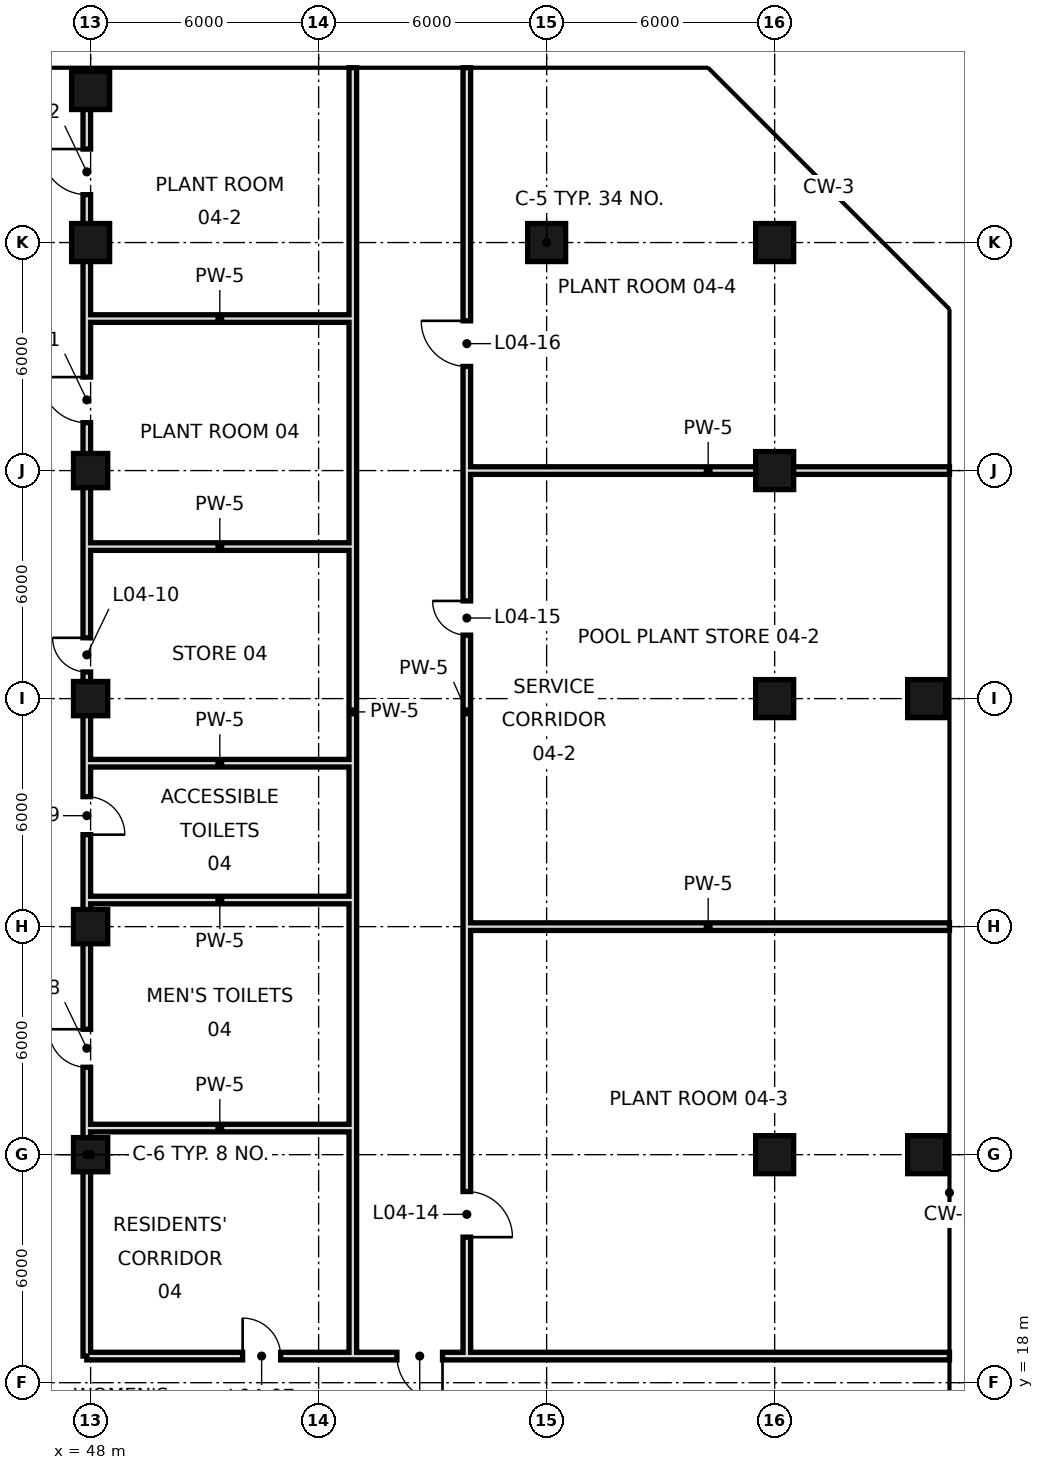
"""IFC4 building model, lengths in metres.
Left out: names, types, materials, properties, quantities, classifications, styles, units other than length and angle.
Written with IfcOpenShell. Run it as: python <this file> out.ifc"""

import sys

from ifc_helpers import new_model, si_unit, direction, frame, frame_2d, origin, origin_2d, place, context, subcontext, project, spatial, rectangle, hollow_rectangle, extrude, element, fill, save


model = new_model("IFC4")
c1 = context("Model", 3, precision=1e-05, world=origin(), true_north=direction((0.0, 1.0)))
c2 = subcontext(c1, "Body", "Model", "MODEL_VIEW")
j1 = project(units=[si_unit("LENGTHUNIT", "METRE"), si_unit("PLANEANGLEUNIT", "RADIAN")], contexts=[c1])
p1 = place(None, origin())
s1 = spatial("IfcSite", under=j1, at=p1, CompositionType="ELEMENT")
p2 = place(p1, origin())
s2 = spatial("IfcBuilding", under=s1, at=p2, CompositionType="ELEMENT")
p3 = place(p2, frame((0.0, 0.0, 30.0)))
s3 = spatial("IfcBuildingStorey", under=s2, at=p3, CompositionType="ELEMENT", Elevation=30.0)
for number, where, z_axis, x_axis in (
    (1, (48.0, 24.0, 0.0), (0.0, 0.0, 1.0), (1.0, 0.0, 0.0)),
    (2, (48.0, 30.0, 0.0), (0.0, 0.0, 1.0), (1.0, 0.0, 0.0)),
    (3, (48.0, 36.0, 0.0), (0.0, 0.0, 1.0), (1.0, 0.0, 0.0)),
    (4, (48.0, 42.0, 0.0), (0.0, 0.0, 1.0), (1.0, 0.0, 0.0)),
):
    element("IfcColumn", number, at=place(p3, frame(where, z_axis=z_axis, x_axis=x_axis)), inside=s3, PredefinedType="COLUMN", context=c2, shape_type="SweptSolid", body=[
        extrude(hollow_rectangle(XDim=0.9, YDim=0.9, WallThickness=0.045, at=origin_2d()), origin(), (0.0, 0.0, 1.0), 4.8),
    ])
for number, where, z_axis, x_axis in (
    (5, (48.0, 48.0, 0.0), (0.0, 0.0, 1.0), (1.0, 0.0, 0.0)),
    (6, (48.0, 52.0, 0.0), (0.0, 0.0, 1.0), (1.0, 0.0, 0.0)),
    (7, (60.0, 48.0, 0.0), (0.0, 0.0, 1.0), (1.0, 0.0, 0.0)),
    (8, (66.0, 24.0, 0.0), (0.0, 0.0, 1.0), (1.0, 0.0, 0.0)),
    (9, (66.0, 36.0, 0.0), (0.0, 0.0, 1.0), (1.0, 0.0, 0.0)),
    (10, (66.0, 42.0, 0.0), (0.0, 0.0, 1.0), (1.0, 0.0, 0.0)),
    (11, (66.0, 48.0, 0.0), (0.0, 0.0, 1.0), (1.0, 0.0, 0.0)),
    (12, (70.0, 24.0, 0.0), (0.0, 0.0, 1.0), (1.0, 0.0, 0.0)),
    (13, (70.0, 36.0, 0.0), (0.0, 0.0, 1.0), (1.0, 0.0, 0.0)),
):
    element("IfcColumn", number, at=place(p3, frame(where, z_axis=z_axis, x_axis=x_axis)), inside=s3, PredefinedType="COLUMN", context=c2, shape_type="SweptSolid", body=[
        extrude(hollow_rectangle(XDim=1.0, YDim=1.0, WallThickness=0.05, at=origin_2d()), origin(), (0.0, 0.0, 1.0), 4.8),
    ])
p4 = place(p3, frame((47.9, 18.7, 0.0), z_axis=(0.0, 0.0, 1.0), x_axis=(0.0, 1.0, 0.0)))
e14 = element("IfcWall", 14, at=p4, inside=s3, PredefinedType="SOLIDWALL", context=c2, shape_type="SweptSolid", body=[
    extrude(rectangle(XDim=33.3, YDim=0.2, at=frame_2d((16.65, 0.0))), origin(), (0.0, 0.0, 1.0), 3.7),
])
p5 = place(p4, frame((7.6, 0.0, 0.0)))
e15 = element("IfcOpeningElement", 15, at=p5, cuts=e14, PredefinedType="OPENING", context=c2, shape_type="SweptSolid", body=[
    extrude(rectangle(XDim=1.0, YDim=2.4, at=frame_2d((0.5, 1.2))), frame((0.0, 0.11, 0.0), z_axis=(0.0, -1.0, 0.0), x_axis=(1.0, 0.0, 0.0)), (0.0, 0.0, 1.0), 0.22),
])
p6 = place(p4, frame((13.72, 0.0, 0.0)))
e16 = element("IfcOpeningElement", 16, at=p6, cuts=e14, PredefinedType="OPENING", context=c2, shape_type="SweptSolid", body=[
    extrude(rectangle(XDim=1.0, YDim=2.4, at=frame_2d((0.5, 1.2))), frame((0.0, 0.11, 0.0), z_axis=(0.0, -1.0, 0.0), x_axis=(1.0, 0.0, 0.0)), (0.0, 0.0, 1.0), 0.22),
])
p7 = place(p4, frame((18.0, 0.0, 0.0)))
e17 = element("IfcOpeningElement", 17, at=p7, cuts=e14, PredefinedType="OPENING", context=c2, shape_type="SweptSolid", body=[
    extrude(rectangle(XDim=0.9, YDim=2.1, at=frame_2d((0.45, 1.05))), frame((0.0, 0.11, 0.0), z_axis=(0.0, -1.0, 0.0), x_axis=(1.0, 0.0, 0.0)), (0.0, 0.0, 1.0), 0.22),
])
p8 = place(p4, frame((24.56, 0.0, 0.0)))
e18 = element("IfcOpeningElement", 18, at=p8, cuts=e14, PredefinedType="OPENING", context=c2, shape_type="SweptSolid", body=[
    extrude(rectangle(XDim=1.2, YDim=2.4, at=frame_2d((0.6, 1.2))), frame((0.0, 0.11, 0.0), z_axis=(0.0, -1.0, 0.0), x_axis=(1.0, 0.0, 0.0)), (0.0, 0.0, 1.0), 0.22),
])
p9 = place(p4, frame((30.56, 0.0, 0.0)))
e19 = element("IfcOpeningElement", 19, at=p9, cuts=e14, PredefinedType="OPENING", context=c2, shape_type="SweptSolid", body=[
    extrude(rectangle(XDim=1.2, YDim=2.4, at=frame_2d((0.6, 1.2))), frame((0.0, 0.11, 0.0), z_axis=(0.0, -1.0, 0.0), x_axis=(1.0, 0.0, 0.0)), (0.0, 0.0, 1.0), 0.22),
])
p10 = place(p3, frame((54.9, 18.7, 0.0), z_axis=(0.0, 0.0, 1.0), x_axis=(0.0, 1.0, 0.0)))
e20 = element("IfcWall", 20, at=p10, inside=s3, PredefinedType="SOLIDWALL", context=c2, shape_type="SweptSolid", body=[
    extrude(rectangle(XDim=33.9, YDim=0.2, at=frame_2d((16.95, 0.0))), origin(), (0.0, 0.0, 1.0), 3.5),
])
p11 = place(p3, frame((57.9, 18.7, 0.0), z_axis=(0.0, 0.0, 1.0), x_axis=(0.0, 1.0, 0.0)))
e21 = element("IfcWall", 21, at=p11, inside=s3, PredefinedType="SOLIDWALL", context=c2, shape_type="SweptSolid", body=[
    extrude(rectangle(XDim=33.9, YDim=0.2, at=frame_2d((16.95, 0.0))), origin(), (0.0, 0.0, 1.0), 3.5),
])
p12 = place(p11, frame((3.13, 0.0, 0.0)))
e22 = element("IfcOpeningElement", 22, at=p12, cuts=e21, PredefinedType="OPENING", context=c2, shape_type="SweptSolid", body=[
    extrude(rectangle(XDim=1.2, YDim=2.4, at=frame_2d((0.6, 1.2))), frame((0.0, 0.11, 0.0), z_axis=(0.0, -1.0, 0.0), x_axis=(1.0, 0.0, 0.0)), (0.0, 0.0, 1.0), 0.22),
])
p13 = place(p11, frame((18.97, 0.0, 0.0)))
e23 = element("IfcOpeningElement", 23, at=p13, cuts=e21, PredefinedType="OPENING", context=c2, shape_type="SweptSolid", body=[
    extrude(rectangle(XDim=0.9, YDim=2.1, at=frame_2d((0.45, 1.05))), frame((0.0, 0.11, 0.0), z_axis=(0.0, -1.0, 0.0), x_axis=(1.0, 0.0, 0.0)), (0.0, 0.0, 1.0), 0.22),
])
p14 = place(p11, frame((26.04, 0.0, 0.0)))
e24 = element("IfcOpeningElement", 24, at=p14, cuts=e21, PredefinedType="OPENING", context=c2, shape_type="SweptSolid", body=[
    extrude(rectangle(XDim=1.2, YDim=2.4, at=frame_2d((0.6, 1.2))), frame((0.0, 0.11, 0.0), z_axis=(0.0, -1.0, 0.0), x_axis=(1.0, 0.0, 0.0)), (0.0, 0.0, 1.0), 0.22),
])
p15 = place(p3, frame((47.9, 18.7, 0.0), z_axis=(0.0, 0.0, 1.0), x_axis=(1.0, 0.0, 0.0)))
e25 = element("IfcWall", 25, at=p15, inside=s3, PredefinedType="SOLIDWALL", context=c2, shape_type="SweptSolid", body=[
    extrude(rectangle(XDim=22.7, YDim=0.2, at=frame_2d((11.35, 0.0))), origin(), (0.0, 0.0, 1.0), 3.7),
])
p16 = place(p15, frame((4.1, 0.0, 0.0)))
e26 = element("IfcOpeningElement", 26, at=p16, cuts=e25, PredefinedType="OPENING", context=c2, shape_type="SweptSolid", body=[
    extrude(rectangle(XDim=1.0, YDim=2.4, at=frame_2d((0.5, 1.2))), frame((0.0, 0.11, 0.0), z_axis=(0.0, -1.0, 0.0), x_axis=(1.0, 0.0, 0.0)), (0.0, 0.0, 1.0), 0.22),
])
p17 = place(p15, frame((8.16, 0.0, 0.0)))
e27 = element("IfcOpeningElement", 27, at=p17, cuts=e25, PredefinedType="OPENING", context=c2, shape_type="SweptSolid", body=[
    extrude(rectangle(XDim=1.2, YDim=2.4, at=frame_2d((0.6, 1.2))), frame((0.0, 0.11, 0.0), z_axis=(0.0, -1.0, 0.0), x_axis=(1.0, 0.0, 0.0)), (0.0, 0.0, 1.0), 0.22),
])
p18 = place(p3, frame((47.9, 24.7, 0.0), z_axis=(0.0, 0.0, 1.0), x_axis=(1.0, 0.0, 0.0)))
e28 = element("IfcWall", 28, at=p18, inside=s3, PredefinedType="SOLIDWALL", context=c2, shape_type="SweptSolid", body=[
    extrude(rectangle(XDim=7.0, YDim=0.2, at=frame_2d((3.5, 0.0))), origin(), (0.0, 0.0, 1.0), 3.95),
])
p19 = place(p3, frame((57.9, 30.0, 0.0), z_axis=(0.0, 0.0, 1.0), x_axis=(1.0, 0.0, 0.0)))
e29 = element("IfcWall", 29, at=p19, inside=s3, PredefinedType="SOLIDWALL", context=c2, shape_type="SweptSolid", body=[
    extrude(rectangle(XDim=12.7, YDim=0.2, at=frame_2d((6.35, 0.0))), origin(), (0.0, 0.0, 1.0), 3.5),
])
for number, where, z_axis, x_axis in (
    (30, (47.9, 30.7, 0.0), (0.0, 0.0, 1.0), (1.0, 0.0, 0.0)),
    (31, (47.9, 34.3, 0.0), (0.0, 0.0, 1.0), (1.0, 0.0, 0.0)),
    (32, (47.9, 40.0, 0.0), (0.0, 0.0, 1.0), (1.0, 0.0, 0.0)),
):
    element("IfcWall", number, at=place(p3, frame(where, z_axis=z_axis, x_axis=x_axis)), inside=s3, PredefinedType="SOLIDWALL", context=c2, shape_type="SweptSolid", body=[
        extrude(rectangle(XDim=7.0, YDim=0.2, at=frame_2d((3.5, 0.0))), origin(), (0.0, 0.0, 1.0), 3.95),
    ])
p20 = place(p3, frame((57.9, 42.0, 0.0), z_axis=(0.0, 0.0, 1.0), x_axis=(1.0, 0.0, 0.0)))
e33 = element("IfcWall", 33, at=p20, inside=s3, PredefinedType="SOLIDWALL", context=c2, shape_type="SweptSolid", body=[
    extrude(rectangle(XDim=12.7, YDim=0.2, at=frame_2d((6.35, 0.0))), origin(), (0.0, 0.0, 1.0), 3.5),
])
p21 = place(p3, frame((47.9, 46.0, 0.0), z_axis=(0.0, 0.0, 1.0), x_axis=(1.0, 0.0, 0.0)))
e34 = element("IfcWall", 34, at=p21, inside=s3, PredefinedType="SOLIDWALL", context=c2, shape_type="SweptSolid", body=[
    extrude(rectangle(XDim=7.0, YDim=0.2, at=frame_2d((3.5, 0.0))), origin(), (0.0, 0.0, 1.0), 3.95),
])
p22 = place(p16, origin())
e35 = element("IfcDoor", 35, at=p22, inside=s3, OperationType="SINGLE_SWING_LEFT", PredefinedType="DOOR", context=c2, shape_type="SweptSolid", body=[
    extrude(rectangle(XDim=1.0, YDim=2.4, at=frame_2d((0.5, 1.2))), frame((0.0, 0.025, 0.0), z_axis=(0.0, -1.0, 0.0), x_axis=(1.0, 0.0, 0.0)), (0.0, 0.0, 1.0), 0.05),
])
fill(e26, e35)
p23 = place(p5, frame((1.0, 0.0, 0.0), z_axis=(0.0, 0.0, 1.0), x_axis=(-1.0, 0.0, 0.0)))
e36 = element("IfcDoor", 36, at=p23, inside=s3, OperationType="SINGLE_SWING_LEFT", PredefinedType="DOOR", context=c2, shape_type="SweptSolid", body=[
    extrude(rectangle(XDim=1.0, YDim=2.4, at=frame_2d((0.5, 1.2))), frame((0.0, 0.025, 0.0), z_axis=(0.0, -1.0, 0.0), x_axis=(1.0, 0.0, 0.0)), (0.0, 0.0, 1.0), 0.05),
])
fill(e15, e36)
p24 = place(p6, frame((1.0, 0.0, 0.0), z_axis=(0.0, 0.0, 1.0), x_axis=(-1.0, 0.0, 0.0)))
e37 = element("IfcDoor", 37, at=p24, inside=s3, OperationType="SINGLE_SWING_RIGHT", PredefinedType="DOOR", context=c2, shape_type="SweptSolid", body=[
    extrude(rectangle(XDim=1.0, YDim=2.4, at=frame_2d((0.5, 1.2))), frame((0.0, 0.025, 0.0), z_axis=(0.0, -1.0, 0.0), x_axis=(1.0, 0.0, 0.0)), (0.0, 0.0, 1.0), 0.05),
])
fill(e16, e37)
p25 = place(p7, frame((0.9, 0.0, 0.0), z_axis=(0.0, 0.0, 1.0), x_axis=(-1.0, 0.0, 0.0)))
e38 = element("IfcDoor", 38, at=p25, inside=s3, OperationType="SINGLE_SWING_LEFT", PredefinedType="DOOR", context=c2, shape_type="SweptSolid", body=[
    extrude(rectangle(XDim=0.9, YDim=2.1, at=frame_2d((0.45, 1.05))), frame((0.0, 0.025, 0.0), z_axis=(0.0, -1.0, 0.0), x_axis=(1.0, 0.0, 0.0)), (0.0, 0.0, 1.0), 0.05),
])
fill(e17, e38)
p26 = place(p8, frame((1.2, 0.0, 0.0), z_axis=(0.0, 0.0, 1.0), x_axis=(-1.0, 0.0, 0.0)))
e39 = element("IfcDoor", 39, at=p26, inside=s3, OperationType="SINGLE_SWING_LEFT", PredefinedType="DOOR", context=c2, shape_type="SweptSolid", body=[
    extrude(rectangle(XDim=1.2, YDim=2.4, at=frame_2d((0.6, 1.2))), frame((0.0, 0.025, 0.0), z_axis=(0.0, -1.0, 0.0), x_axis=(1.0, 0.0, 0.0)), (0.0, 0.0, 1.0), 0.05),
])
fill(e18, e39)
p27 = place(p9, frame((1.2, 0.0, 0.0), z_axis=(0.0, 0.0, 1.0), x_axis=(-1.0, 0.0, 0.0)))
e40 = element("IfcDoor", 40, at=p27, inside=s3, OperationType="SINGLE_SWING_LEFT", PredefinedType="DOOR", context=c2, shape_type="SweptSolid", body=[
    extrude(rectangle(XDim=1.2, YDim=2.4, at=frame_2d((0.6, 1.2))), frame((0.0, 0.025, 0.0), z_axis=(0.0, -1.0, 0.0), x_axis=(1.0, 0.0, 0.0)), (0.0, 0.0, 1.0), 0.05),
])
fill(e19, e40)
p28 = place(p17, origin())
e41 = element("IfcDoor", 41, at=p28, inside=s3, OperationType="SINGLE_SWING_RIGHT", PredefinedType="DOOR", context=c2, shape_type="SweptSolid", body=[
    extrude(rectangle(XDim=1.2, YDim=2.4, at=frame_2d((0.6, 1.2))), frame((0.0, 0.025, 0.0), z_axis=(0.0, -1.0, 0.0), x_axis=(1.0, 0.0, 0.0)), (0.0, 0.0, 1.0), 0.05),
])
fill(e27, e41)
p29 = place(p12, frame((1.2, 0.0, 0.0), z_axis=(0.0, 0.0, 1.0), x_axis=(-1.0, 0.0, 0.0)))
e42 = element("IfcDoor", 42, at=p29, inside=s3, OperationType="SINGLE_SWING_RIGHT", PredefinedType="DOOR", context=c2, shape_type="SweptSolid", body=[
    extrude(rectangle(XDim=1.2, YDim=2.4, at=frame_2d((0.6, 1.2))), frame((0.0, 0.025, 0.0), z_axis=(0.0, -1.0, 0.0), x_axis=(1.0, 0.0, 0.0)), (0.0, 0.0, 1.0), 0.05),
])
fill(e22, e42)
p30 = place(p13, frame((0.9, 0.0, 0.0), z_axis=(0.0, 0.0, 1.0), x_axis=(-1.0, 0.0, 0.0)))
e43 = element("IfcDoor", 43, at=p30, inside=s3, OperationType="SINGLE_SWING_LEFT", PredefinedType="DOOR", context=c2, shape_type="SweptSolid", body=[
    extrude(rectangle(XDim=0.9, YDim=2.1, at=frame_2d((0.45, 1.05))), frame((0.0, 0.025, 0.0), z_axis=(0.0, -1.0, 0.0), x_axis=(1.0, 0.0, 0.0)), (0.0, 0.0, 1.0), 0.05),
])
fill(e23, e43)
p31 = place(p14, frame((1.2, 0.0, 0.0), z_axis=(0.0, 0.0, 1.0), x_axis=(-1.0, 0.0, 0.0)))
e44 = element("IfcDoor", 44, at=p31, inside=s3, OperationType="SINGLE_SWING_LEFT", PredefinedType="DOOR", context=c2, shape_type="SweptSolid", body=[
    extrude(rectangle(XDim=1.2, YDim=2.4, at=frame_2d((0.6, 1.2))), frame((0.0, 0.025, 0.0), z_axis=(0.0, -1.0, 0.0), x_axis=(1.0, 0.0, 0.0)), (0.0, 0.0, 1.0), 0.05),
])
fill(e24, e44)
save(model, sys.argv[1])
